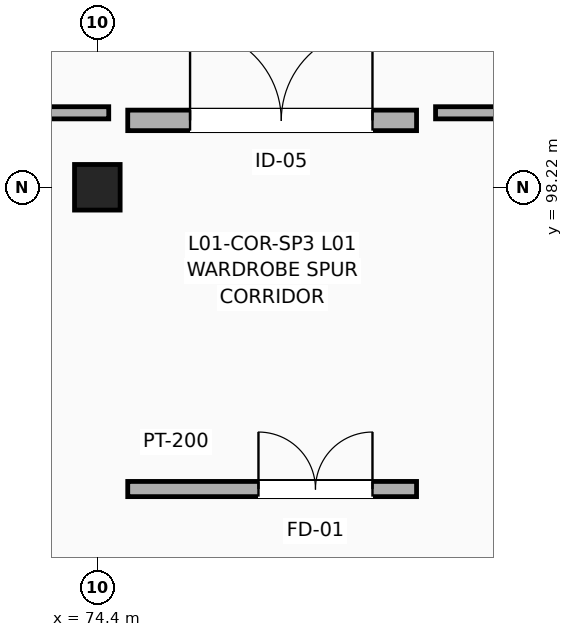
"""IFC4 building model, lengths in metres.
Left out: names, types, materials, properties, quantities, classifications, styles, units other than length and angle.
Written with IfcOpenShell. Run it as: python <this file> out.ifc"""

import sys

from ifc_helpers import new_model, si_unit, direction, frame, frame_2d, origin, origin_2d, place, context, subcontext, project, spatial, rectangle, extrude, element, fill, save


model = new_model("IFC4")
c1 = context("Model", 3, precision=1e-05, world=origin(), true_north=direction((0.0, 1.0)))
c2 = subcontext(c1, "Body", "Model", "MODEL_VIEW")
j1 = project(units=[si_unit("LENGTHUNIT", "METRE"), si_unit("PLANEANGLEUNIT", "RADIAN")], contexts=[c1])
p1 = place(None, origin())
s1 = spatial("IfcSite", under=j1, at=p1, CompositionType="ELEMENT")
p2 = place(p1, origin())
s2 = spatial("IfcBuilding", under=s1, at=p2, CompositionType="ELEMENT")
p3 = place(p2, frame((0.0, 0.0, 5.4)))
s3 = spatial("IfcBuildingStorey", under=s2, at=p3, CompositionType="ELEMENT", Elevation=5.4)
p4 = place(p3, frame((74.4, 98.22, 0.0), z_axis=(0.0, 0.0, 1.0), x_axis=(1.0, 0.0, 0.0)))
e1 = element("IfcColumn", 1, at=p4, inside=s3, PredefinedType="COLUMN", context=c2, shape_type="SweptSolid", body=[
    extrude(rectangle(XDim=0.6, YDim=0.6, at=origin_2d()), origin(), (0.0, 0.0, 1.0), 4.8),
])
p5 = place(p3, frame((74.8, 94.25, 0.0), z_axis=(0.0, 0.0, 1.0), x_axis=(1.0, 0.0, 0.0)))
e2 = element("IfcWall", 2, at=p5, inside=s3, PredefinedType="PARTITIONING", context=c2, shape_type="SweptSolid", body=[
    extrude(rectangle(XDim=3.8, YDim=0.2, at=frame_2d((1.9, 0.0))), origin(), (0.0, 0.0, 1.0), 4.187),
])
p6 = place(p5, frame((1.72, 0.0, 0.0)))
e3 = element("IfcOpeningElement", 3, at=p6, cuts=e2, PredefinedType="OPENING", context=c2, shape_type="SweptSolid", body=[
    extrude(rectangle(XDim=1.5, YDim=2.2, at=frame_2d((0.75, 1.1))), frame((0.0, 0.11, 0.0), z_axis=(0.0, -1.0, 0.0), x_axis=(1.0, 0.0, 0.0)), (0.0, 0.0, 1.0), 0.22),
])
p7 = place(p3, frame((74.8, 99.1, 0.0), z_axis=(0.0, 0.0, 1.0), x_axis=(1.0, 0.0, 0.0)))
e4 = element("IfcWall", 4, at=p7, inside=s3, PredefinedType="SOLIDWALL", context=c2, shape_type="SweptSolid", body=[
    extrude(rectangle(XDim=3.8, YDim=0.27, at=frame_2d((1.9, 0.0))), origin(), (0.0, 0.0, 1.0), 4.157),
])
p8 = place(p7, frame((0.82, 0.0, 0.0)))
e5 = element("IfcOpeningElement", 5, at=p8, cuts=e4, PredefinedType="OPENING", context=c2, shape_type="SweptSolid", body=[
    extrude(rectangle(XDim=2.4, YDim=2.8, at=frame_2d((1.2, 1.4))), frame((0.0, 0.145, 0.0), z_axis=(0.0, -1.0, 0.0), x_axis=(1.0, 0.0, 0.0)), (0.0, 0.0, 1.0), 0.29),
])
p9 = place(p3, frame((66.8, 99.2, 0.0), z_axis=(0.0, 0.0, 1.0), x_axis=(1.0, 0.0, 0.0)))
e6 = element("IfcWall", 6, at=p9, inside=s3, PredefinedType="PARTITIONING", context=c2, shape_type="SweptSolid", body=[
    extrude(rectangle(XDim=7.75, YDim=0.16, at=frame_2d((3.875, 0.0))), origin(), (0.0, 0.0, 1.0), 3.837),
])
p10 = place(p3, frame((78.85, 99.2, 0.0), z_axis=(0.0, 0.0, 1.0), x_axis=(1.0, 0.0, 0.0)))
e7 = element("IfcWall", 7, at=p10, inside=s3, PredefinedType="PARTITIONING", context=c2, shape_type="SweptSolid", body=[
    extrude(rectangle(XDim=19.35, YDim=0.16, at=frame_2d((9.675, 0.0))), origin(), (0.0, 0.0, 1.0), 3.837),
])
p11 = place(p6, origin())
e8 = element("IfcDoor", 8, at=p11, inside=s3, OperationType="DOUBLE_DOOR_SINGLE_SWING", PredefinedType="DOOR", context=c2, shape_type="SweptSolid", body=[
    extrude(rectangle(XDim=1.5, YDim=2.2, at=frame_2d((0.75, 1.1))), frame((0.0, 0.025, 0.0), z_axis=(0.0, -1.0, 0.0), x_axis=(1.0, 0.0, 0.0)), (0.0, 0.0, 1.0), 0.05),
])
fill(e3, e8)
p12 = place(p8, origin())
e9 = element("IfcDoor", 9, at=p12, inside=s3, OperationType="DOUBLE_DOOR_SINGLE_SWING", PredefinedType="DOOR", context=c2, shape_type="SweptSolid", body=[
    extrude(rectangle(XDim=2.4, YDim=2.8, at=frame_2d((1.2, 1.4))), frame((0.0, 0.025, 0.0), z_axis=(0.0, -1.0, 0.0), x_axis=(1.0, 0.0, 0.0)), (0.0, 0.0, 1.0), 0.05),
])
fill(e5, e9)
save(model, sys.argv[1])
